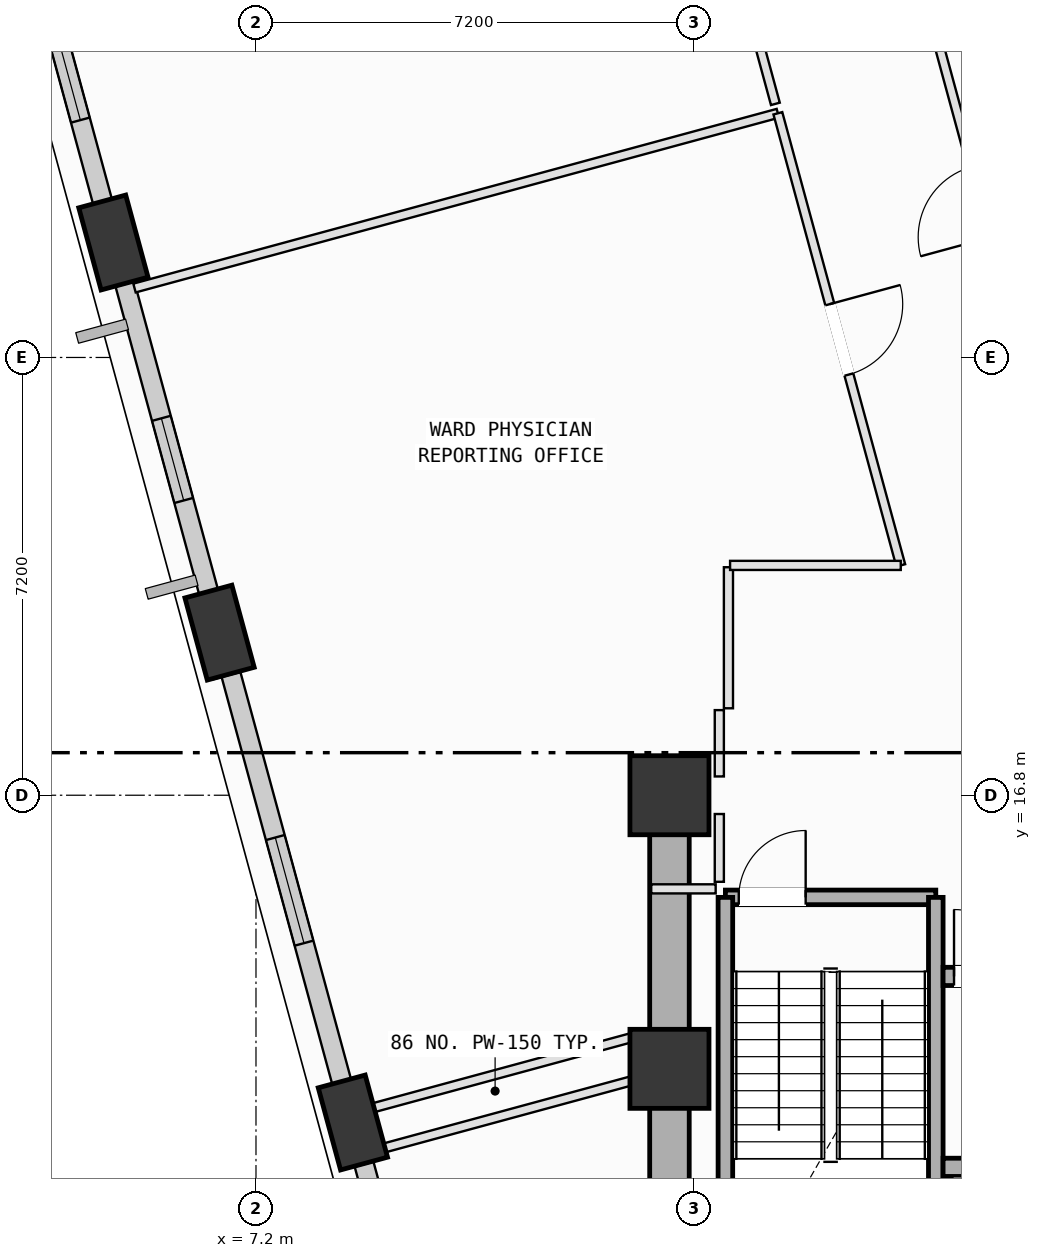
"""IFC4 building model, lengths in metres.
Left out: names, types, materials, properties, quantities, classifications, styles, units other than length and angle.
Written with IfcOpenShell. Run it as: python <this file> out.ifc"""

import sys

from ifc_helpers import new_model, si_unit, direction, frame, frame_2d, origin, origin_2d, place, context, subcontext, project, spatial, rectangle, extrude, element, fill, save


model = new_model("IFC4")
c1 = context("Model", 3, precision=1e-05, world=origin(), true_north=direction((0.0, 1.0)))
c2 = subcontext(c1, "Body", "Model", "MODEL_VIEW")
j1 = project(units=[si_unit("LENGTHUNIT", "METRE"), si_unit("PLANEANGLEUNIT", "RADIAN")], contexts=[c1])
p1 = place(None, origin())
s1 = spatial("IfcSite", under=j1, at=p1, CompositionType="ELEMENT")
p2 = place(p1, origin())
s2 = spatial("IfcBuilding", under=s1, at=p2, CompositionType="ELEMENT")
p3 = place(p2, frame((0.0, 0.0, 88.4)))
s3 = spatial("IfcBuildingStorey", under=s2, at=p3, CompositionType="ELEMENT", Elevation=88.4)
for number, where, z_axis, x_axis in (
    (1, (14.0, 12.3, 0.0), (0.0, 0.0, 1.0), (1.0, 0.0, 0.0)),
    (2, (14.0, 16.8, 0.0), (0.0, 0.0, 1.0), (1.0, 0.0, 0.0)),
):
    element("IfcColumn", number, at=place(p3, frame(where, z_axis=z_axis, x_axis=x_axis)), inside=s3, PredefinedType="COLUMN", context=c2, shape_type="SweptSolid", body=[
        extrude(rectangle(XDim=1.3, YDim=1.3, at=origin_2d()), origin(), (0.0, 0.0, 1.0), 4.0),
    ])
p4 = place(p3, frame((4.855, 25.891, 0.095), z_axis=(-0.003602216737, -0.118314187664, 0.992969675787), x_axis=(-0.232906733675, 0.965767262988, 0.114228048877)))
e3 = element("IfcColumn", 3, at=p4, inside=s3, PredefinedType="COLUMN", context=c2, shape_type="SweptSolid", body=[
    extrude(rectangle(XDim=1.4, YDim=0.8, at=origin_2d()), origin(), (0.0, 0.0, 1.0), 3.931),
])
p5 = place(p3, frame((6.601, 19.475, 0.091), z_axis=(0.022845953935, -0.111063618452, 0.993550670598), x_axis=(-0.449992639762, 0.886303218175, 0.109422253733)))
e4 = element("IfcColumn", 4, at=p5, inside=s3, PredefinedType="COLUMN", context=c2, shape_type="SweptSolid", body=[
    extrude(rectangle(XDim=1.4, YDim=0.8, at=origin_2d()), origin(), (0.0, 0.0, 1.0), 3.933),
])
p6 = place(p3, frame((8.793, 11.417, 0.093), z_axis=(0.055949258241, -0.101714633739, 0.993239051682), x_axis=(-0.691683069188, 0.713459698428, 0.112025847538)))
e5 = element("IfcColumn", 5, at=p6, inside=s3, PredefinedType="COLUMN", context=c2, shape_type="SweptSolid", body=[
    extrude(rectangle(XDim=1.4, YDim=0.8, at=origin_2d()), origin(), (0.0, 0.0, 1.0), 3.932),
])
p7 = place(p3, frame((4.787, 26.156, 0.0), z_axis=(0.0, 0.0, 1.0), x_axis=(-0.262236334179, 0.965003681359, 0.0)))
e6 = element("IfcWall", 6, at=p7, inside=s3, PredefinedType="SOLIDWALL", context=c2, shape_type="SweptSolid", body=[
    extrude(rectangle(XDim=5.628, YDim=0.32, at=frame_2d((2.814, 0.0))), origin(), (0.0, 0.0, 1.0), 3.165),
])
p8 = place(p7, frame((1.811, 0.0, 0.75)))
e7 = element("IfcOpeningElement", 7, at=p8, cuts=e6, PredefinedType="OPENING", context=c2, shape_type="SweptSolid", body=[
    extrude(rectangle(XDim=2.0, YDim=1.95, at=frame_2d((1.0, 0.975))), frame((0.0, 0.17, 0.0), z_axis=(0.0, -1.0, 0.0), x_axis=(1.0, 0.0, 0.0)), (0.0, 0.0, 1.0), 0.34),
])
p9 = place(p3, frame((6.529, 19.744, 0.0), z_axis=(0.0, 0.0, 1.0), x_axis=(-0.262197887249, 0.965014128354, 0.0)))
e8 = element("IfcWall", 8, at=p9, inside=s3, PredefinedType="SOLIDWALL", context=c2, shape_type="SweptSolid", body=[
    extrude(rectangle(XDim=5.662, YDim=0.32, at=frame_2d((2.831, 0.0))), origin(), (0.0, 0.0, 1.0), 3.165),
])
p10 = place(p9, frame((1.973, 0.0, 0.75)))
e9 = element("IfcOpeningElement", 9, at=p10, cuts=e8, PredefinedType="OPENING", context=c2, shape_type="SweptSolid", body=[
    extrude(rectangle(XDim=1.4, YDim=1.85, at=frame_2d((0.7, 0.925))), frame((0.0, 0.17, 0.0), z_axis=(0.0, -1.0, 0.0), x_axis=(1.0, 0.0, 0.0)), (0.0, 0.0, 1.0), 0.34),
])
p11 = place(p3, frame((8.719, 11.684, 0.0), z_axis=(0.0, 0.0, 1.0), x_axis=(-0.262177034056, 0.965019794001, 0.0)))
e10 = element("IfcWall", 10, at=p11, inside=s3, PredefinedType="SOLIDWALL", context=c2, shape_type="SweptSolid", body=[
    extrude(rectangle(XDim=7.36, YDim=0.32, at=frame_2d((3.68, 0.0))), origin(), (0.0, 0.0, 1.0), 3.165),
])
p12 = place(p11, frame((2.781, 0.0, 0.75)))
e11 = element("IfcOpeningElement", 11, at=p12, cuts=e10, PredefinedType="OPENING", context=c2, shape_type="SweptSolid", body=[
    extrude(rectangle(XDim=1.8, YDim=2.05, at=frame_2d((0.9, 1.025))), frame((0.0, 0.17, 0.0), z_axis=(0.0, -1.0, 0.0), x_axis=(1.0, 0.0, 0.0)), (0.0, 0.0, 1.0), 0.34),
])
p13 = place(p3, frame((10.609, 4.726, 0.0), z_axis=(0.0, 0.0, 1.0), x_axis=(-0.262164626443, 0.965023164821, 0.0)))
e12 = element("IfcWall", 12, at=p13, inside=s3, PredefinedType="SOLIDWALL", context=c2, shape_type="SweptSolid", body=[
    extrude(rectangle(XDim=6.224, YDim=0.32, at=frame_2d((3.112, 0.0))), origin(), (0.0, 0.0, 1.0), 3.165),
])
p14 = place(p13, frame((2.514, 0.0, 0.75)))
e13 = element("IfcOpeningElement", 13, at=p14, cuts=e12, PredefinedType="OPENING", context=c2, shape_type="SweptSolid", body=[
    extrude(rectangle(XDim=1.2, YDim=1.75, at=frame_2d((0.6, 0.875))), frame((0.0, 0.17, 0.0), z_axis=(0.0, -1.0, 0.0), x_axis=(1.0, 0.0, 0.0)), (0.0, 0.0, 1.0), 0.34),
])
p15 = place(p13, frame((4.433, 0.0, 0.75)))
e14 = element("IfcOpeningElement", 14, at=p15, cuts=e12, PredefinedType="OPENING", context=c2, shape_type="SweptSolid", body=[
    extrude(rectangle(XDim=1.2, YDim=1.75, at=frame_2d((0.6, 0.875))), frame((0.0, 0.17, 0.0), z_axis=(0.0, -1.0, 0.0), x_axis=(1.0, 0.0, 0.0)), (0.0, 0.0, 1.0), 0.34),
])
p16 = place(p3, frame((14.92, 15.12, 0.0), z_axis=(0.0, 0.0, 1.0), x_axis=(1.0, 0.0, 0.0)))
e15 = element("IfcWall", 15, at=p16, inside=s3, PredefinedType="SOLIDWALL", context=c2, shape_type="SweptSolid", body=[
    extrude(rectangle(XDim=3.46, YDim=0.24, at=frame_2d((1.73, 0.0))), origin(), (0.0, 0.0, 1.0), 3.78),
])
p17 = place(p16, frame((0.22, 0.0, 0.0)))
e16 = element("IfcOpeningElement", 16, at=p17, cuts=e15, PredefinedType="OPENING", context=c2, shape_type="SweptSolid", body=[
    extrude(rectangle(XDim=1.1, YDim=2.15, at=frame_2d((0.55, 1.075))), frame((0.0, 0.13, 0.0), z_axis=(0.0, -1.0, 0.0), x_axis=(1.0, 0.0, 0.0)), (0.0, 0.0, 1.0), 0.26),
])
for number, where, z_axis, x_axis in (
    (17, (18.38, 15.12, 0.0), (0.0, 0.0, 1.0), (0.0, -1.0, 0.0)),
    (18, (14.92, 8.125, 0.0), (0.0, 0.0, 1.0), (0.0, 1.0, 0.0)),
):
    element("IfcWall", number, at=place(p3, frame(where, z_axis=z_axis, x_axis=x_axis)), inside=s3, PredefinedType="SOLIDWALL", context=c2, shape_type="SweptSolid", body=[
        extrude(rectangle(XDim=6.995, YDim=0.24, at=frame_2d((3.498, 0.0))), origin(), (0.0, 0.0, 1.0), 3.78),
    ])
p18 = place(p3, frame((14.0, 16.8, 0.0), z_axis=(0.0, 0.0, 1.0), x_axis=(0.0, -1.0, 0.0)))
e19 = element("IfcWall", 19, at=p18, inside=s3, PredefinedType="SHEAR", context=c2, shape_type="SweptSolid", body=[
    extrude(rectangle(XDim=9.0, YDim=0.65, at=frame_2d((4.5, 0.0))), origin(), (0.0, 0.0, 1.0), 3.78),
])
p19 = place(p3, frame((18.5, 10.68, 0.0), z_axis=(0.0, 0.0, 1.0), x_axis=(1.0, 0.0, 0.0)))
e20 = element("IfcWall", 20, at=p19, inside=s3, PredefinedType="SOLIDWALL", context=c2, shape_type="SweptSolid", body=[
    extrude(rectangle(XDim=5.3, YDim=0.3, at=frame_2d((2.65, 0.0))), origin(), (0.0, 0.0, 1.0), 3.78),
])
p20 = place(p19, frame((4.22, 0.0, 0.0)))
e21 = element("IfcOpeningElement", 21, at=p20, cuts=e20, PredefinedType="OPENING", context=c2, shape_type="SweptSolid", body=[
    extrude(rectangle(XDim=0.86, YDim=2.06, at=frame_2d((0.43, 1.03))), frame((0.0, 0.16, 0.0), z_axis=(0.0, -1.0, 0.0), x_axis=(1.0, 0.0, 0.0)), (0.0, 0.0, 1.0), 0.32),
])
p21 = place(p19, frame((0.425, 0.0, 0.0)))
e22 = element("IfcOpeningElement", 22, at=p21, cuts=e20, PredefinedType="OPENING", context=c2, shape_type="SweptSolid", body=[
    extrude(rectangle(XDim=1.25, YDim=2.18, at=frame_2d((0.625, 1.09))), frame((0.0, 0.16, 0.0), z_axis=(0.0, -1.0, 0.0), x_axis=(1.0, 0.0, 0.0)), (0.0, 0.0, 1.0), 0.32),
])
p22 = place(p19, frame((2.525, 0.0, 0.0)))
e23 = element("IfcOpeningElement", 23, at=p22, cuts=e20, PredefinedType="OPENING", context=c2, shape_type="SweptSolid", body=[
    extrude(rectangle(XDim=1.25, YDim=2.18, at=frame_2d((0.625, 1.09))), frame((0.0, 0.16, 0.0), z_axis=(0.0, -1.0, 0.0), x_axis=(1.0, 0.0, 0.0)), (0.0, 0.0, 1.0), 0.32),
])
p23 = place(p3, frame((18.5, 13.82, 0.0), z_axis=(0.0, 0.0, 1.0), x_axis=(1.0, 0.0, 0.0)))
e24 = element("IfcWall", 24, at=p23, inside=s3, PredefinedType="SOLIDWALL", context=c2, shape_type="SweptSolid", body=[
    extrude(rectangle(XDim=5.3, YDim=0.3, at=frame_2d((2.65, 0.0))), origin(), (0.0, 0.0, 1.0), 3.78),
])
p24 = place(p23, frame((0.18, 0.0, 0.0)))
e25 = element("IfcOpeningElement", 25, at=p24, cuts=e24, PredefinedType="OPENING", context=c2, shape_type="SweptSolid", body=[
    extrude(rectangle(XDim=1.1, YDim=2.15, at=frame_2d((0.55, 1.075))), frame((0.0, 0.16, 0.0), z_axis=(0.0, -1.0, 0.0), x_axis=(1.0, 0.0, 0.0)), (0.0, 0.0, 1.0), 0.32),
])
p25 = place(p3, frame((8.788, 10.857, 0.0), z_axis=(0.0, 0.0, 1.0), x_axis=(0.965043326871, 0.262090399027, 0.0)))
e26 = element("IfcWall", 26, at=p25, inside=s3, PredefinedType="PARTITIONING", context=c2, shape_type="SweptSolid", body=[
    extrude(rectangle(XDim=5.09, YDim=0.15, at=frame_2d((2.545, 0.0))), origin(), (0.0, 0.0, 1.0), 2.765),
])
p26 = place(p3, frame((14.97, 20.55, 0.0), z_axis=(0.0, 0.0, 1.0), x_axis=(0.0, -1.0, 0.0)))
e27 = element("IfcWall", 27, at=p26, inside=s3, PredefinedType="PARTITIONING", context=c2, shape_type="SweptSolid", body=[
    extrude(rectangle(XDim=2.32, YDim=0.15, at=frame_2d((1.16, 0.0))), origin(), (0.0, 0.0, 1.0), 2.765),
])
p27 = place(p3, frame((14.82, 18.2, 0.0), z_axis=(0.0, 0.0, 1.0), x_axis=(0.0, -1.0, 0.0)))
e28 = element("IfcWall", 28, at=p27, inside=s3, PredefinedType="PARTITIONING", context=c2, shape_type="SweptSolid", body=[
    extrude(rectangle(XDim=1.091, YDim=0.15, at=frame_2d((0.545, 0.0))), origin(), (0.0, 0.0, 1.0), 3.78),
])
p28 = place(p3, frame((14.82, 16.491, 0.0), z_axis=(0.0, 0.0, 1.0), x_axis=(0.0, -1.0, 0.0)))
e29 = element("IfcWall", 29, at=p28, inside=s3, PredefinedType="PARTITIONING", context=c2, shape_type="SweptSolid", body=[
    extrude(rectangle(XDim=1.115, YDim=0.15, at=frame_2d((0.558, 0.0))), origin(), (0.0, 0.0, 1.0), 3.78),
])
p29 = place(p3, frame((14.76, 15.26, 0.0), z_axis=(0.0, 0.0, 1.0), x_axis=(-1.0, 0.0, 0.0)))
e30 = element("IfcWall", 30, at=p29, inside=s3, PredefinedType="PARTITIONING", context=c2, shape_type="SweptSolid", body=[
    extrude(rectangle(XDim=1.06, YDim=0.15, at=frame_2d((0.53, 0.0))), origin(), (0.0, 0.0, 1.0), 3.78),
])
p30 = place(p3, frame((13.7, 12.901, 0.0), z_axis=(0.0, 0.0, 1.0), x_axis=(-0.965050804905, -0.262062862595, 0.0)))
e31 = element("IfcWall", 31, at=p30, inside=s3, PredefinedType="PARTITIONING", context=c2, shape_type="SweptSolid", body=[
    extrude(rectangle(XDim=5.094, YDim=0.15, at=frame_2d((2.547, 0.0))), origin(), (0.0, 0.0, 1.0), 3.78),
])
p31 = place(p3, frame((6.567, 18.726, 0.0), z_axis=(0.0, 0.0, 1.0), x_axis=(-0.262179910304, 0.965019012576, 0.0)))
e32 = element("IfcWall", 32, at=p31, inside=s3, PredefinedType="PARTITIONING", context=c2, shape_type="SweptSolid", body=[
    extrude(rectangle(XDim=0.992, YDim=0.15, at=frame_2d((0.496, 0.0))), origin(), (0.0, 0.0, 1.0), 3.165),
])
p32 = place(p3, frame((5.202, 25.142, 0.0), z_axis=(0.0, 0.0, 1.0), x_axis=(0.965034618354, 0.262122462558, 0.0)))
e33 = element("IfcWall", 33, at=p32, inside=s3, PredefinedType="PARTITIONING", context=c2, shape_type="SweptSolid", body=[
    extrude(rectangle(XDim=10.964, YDim=0.15, at=frame_2d((5.482, 0.0))), origin(), (0.0, 0.0, 1.0), 3.78),
])
p33 = place(p3, frame((15.783, 28.016, 0.0), z_axis=(0.0, 0.0, 1.0), x_axis=(0.26227015523, -0.964994489972, 0.0)))
e34 = element("IfcWall", 34, at=p33, inside=s3, PredefinedType="PARTITIONING", context=c2, shape_type="SweptSolid", body=[
    extrude(rectangle(XDim=7.706, YDim=0.15, at=frame_2d((3.853, 0.0))), origin(), (0.0, 0.0, 1.0), 3.78),
])
p34 = place(p33, frame((3.253, 0.0, 0.0)))
e35 = element("IfcOpeningElement", 35, at=p34, cuts=e34, PredefinedType="OPENING", context=c2, shape_type="SweptSolid", body=[
    extrude(rectangle(XDim=1.2, YDim=2.15, at=frame_2d((0.6, 1.075))), frame((0.0, 0.085, 0.0), z_axis=(0.0, -1.0, 0.0), x_axis=(1.0, 0.0, 0.0)), (0.0, 0.0, 1.0), 0.17),
])
p35 = place(p3, frame((17.804, 20.58, 0.0), z_axis=(0.0, 0.0, 1.0), x_axis=(-1.0, 0.0, 0.0)))
e36 = element("IfcWall", 36, at=p35, inside=s3, PredefinedType="PARTITIONING", context=c2, shape_type="SweptSolid", body=[
    extrude(rectangle(XDim=2.807, YDim=0.15, at=frame_2d((1.403, 0.0))), origin(), (0.0, 0.0, 1.0), 3.78),
])
p36 = place(p3, frame((12.69, 39.403, 0.0), z_axis=(0.0, 0.0, 1.0), x_axis=(0.262212125461, -0.965010259666, 0.0)))
e37 = element("IfcWall", 37, at=p36, inside=s3, PredefinedType="PARTITIONING", context=c2, shape_type="SweptSolid", body=[
    extrude(rectangle(XDim=11.639, YDim=0.15, at=frame_2d((5.82, 0.0))), origin(), (0.0, 0.0, 1.0), 3.78),
])
p37 = place(p36, frame((5.219, 0.0, 0.0)))
e38 = element("IfcOpeningElement", 38, at=p37, cuts=e37, PredefinedType="OPENING", context=c2, shape_type="SweptSolid", body=[
    extrude(rectangle(XDim=1.2, YDim=2.15, at=frame_2d((0.6, 1.075))), frame((0.0, 0.085, 0.0), z_axis=(0.0, -1.0, 0.0), x_axis=(1.0, 0.0, 0.0)), (0.0, 0.0, 1.0), 0.17),
])
p38 = place(p3, frame((4.808, 25.2, 0.0), z_axis=(0.0, 0.0, 1.0), x_axis=(-0.261915642478, 0.965090770977, 0.0)))
e39 = element("IfcWall", 39, at=p38, inside=s3, PredefinedType="PARTITIONING", context=c2, shape_type="SweptSolid", body=[
    extrude(rectangle(XDim=0.928, YDim=0.15, at=frame_2d((0.464, 0.0))), origin(), (0.0, 0.0, 1.0), 3.165),
])
p39 = place(p3, frame((19.98, 23.441, 0.0), z_axis=(0.0, 0.0, 1.0), x_axis=(-0.262234720493, 0.965004119871, 0.0)))
e40 = element("IfcWall", 40, at=p39, inside=s3, PredefinedType="PARTITIONING", context=c2, shape_type="SweptSolid", body=[
    extrude(rectangle(XDim=6.46, YDim=0.15, at=frame_2d((3.23, 0.0))), origin(), (0.0, 0.0, 1.0), 3.78),
])
p40 = place(p39, frame((2.63, 0.0, 0.0)))
e41 = element("IfcOpeningElement", 41, at=p40, cuts=e40, PredefinedType="OPENING", context=c2, shape_type="SweptSolid", body=[
    extrude(rectangle(XDim=1.2, YDim=2.15, at=frame_2d((0.6, 1.075))), frame((0.0, 0.085, 0.0), z_axis=(0.0, -1.0, 0.0), x_axis=(1.0, 0.0, 0.0)), (0.0, 0.0, 1.0), 0.17),
])
p41 = place(p8, origin())
e42 = element("IfcWindow", 42, at=p41, inside=s3, PartitioningType="SINGLE_PANEL", PredefinedType="WINDOW", context=c2, shape_type="SweptSolid", body=[
    extrude(rectangle(XDim=2.0, YDim=1.95, at=frame_2d((1.0, 0.975))), frame((0.0, 0.03, 0.0), z_axis=(0.0, -1.0, 0.0), x_axis=(1.0, 0.0, 0.0)), (0.0, 0.0, 1.0), 0.06),
])
fill(e7, e42)
p42 = place(p10, origin())
e43 = element("IfcWindow", 43, at=p42, inside=s3, PartitioningType="SINGLE_PANEL", PredefinedType="WINDOW", context=c2, shape_type="SweptSolid", body=[
    extrude(rectangle(XDim=1.4, YDim=1.85, at=frame_2d((0.7, 0.925))), frame((0.0, 0.03, 0.0), z_axis=(0.0, -1.0, 0.0), x_axis=(1.0, 0.0, 0.0)), (0.0, 0.0, 1.0), 0.06),
])
fill(e9, e43)
p43 = place(p12, origin())
e44 = element("IfcWindow", 44, at=p43, inside=s3, PartitioningType="SINGLE_PANEL", PredefinedType="WINDOW", context=c2, shape_type="SweptSolid", body=[
    extrude(rectangle(XDim=1.8, YDim=2.05, at=frame_2d((0.9, 1.025))), frame((0.0, 0.03, 0.0), z_axis=(0.0, -1.0, 0.0), x_axis=(1.0, 0.0, 0.0)), (0.0, 0.0, 1.0), 0.06),
])
fill(e11, e44)
p44 = place(p17, origin())
e45 = element("IfcDoor", 45, at=p44, inside=s3, OperationType="SINGLE_SWING_RIGHT", PredefinedType="DOOR", context=c2, shape_type="SweptSolid", body=[
    extrude(rectangle(XDim=1.1, YDim=2.15, at=frame_2d((0.55, 1.075))), frame((0.0, 0.025, 0.0), z_axis=(0.0, -1.0, 0.0), x_axis=(1.0, 0.0, 0.0)), (0.0, 0.0, 1.0), 0.05),
])
fill(e16, e45)
p45 = place(p24, origin())
e46 = element("IfcDoor", 46, at=p45, inside=s3, OperationType="SINGLE_SWING_LEFT", PredefinedType="DOOR", context=c2, shape_type="SweptSolid", body=[
    extrude(rectangle(XDim=1.1, YDim=2.15, at=frame_2d((0.55, 1.075))), frame((0.0, 0.025, 0.0), z_axis=(0.0, -1.0, 0.0), x_axis=(1.0, 0.0, 0.0)), (0.0, 0.0, 1.0), 0.05),
])
fill(e25, e46)
p46 = place(p34, origin())
e47 = element("IfcDoor", 47, at=p46, inside=s3, OperationType="SINGLE_SWING_LEFT", PredefinedType="DOOR", context=c2, shape_type="SweptSolid", body=[
    extrude(rectangle(XDim=1.2, YDim=2.15, at=frame_2d((0.6, 1.075))), frame((0.0, 0.025, 0.0), z_axis=(0.0, -1.0, 0.0), x_axis=(1.0, 0.0, 0.0)), (0.0, 0.0, 1.0), 0.05),
])
fill(e35, e47)
save(model, sys.argv[1])
